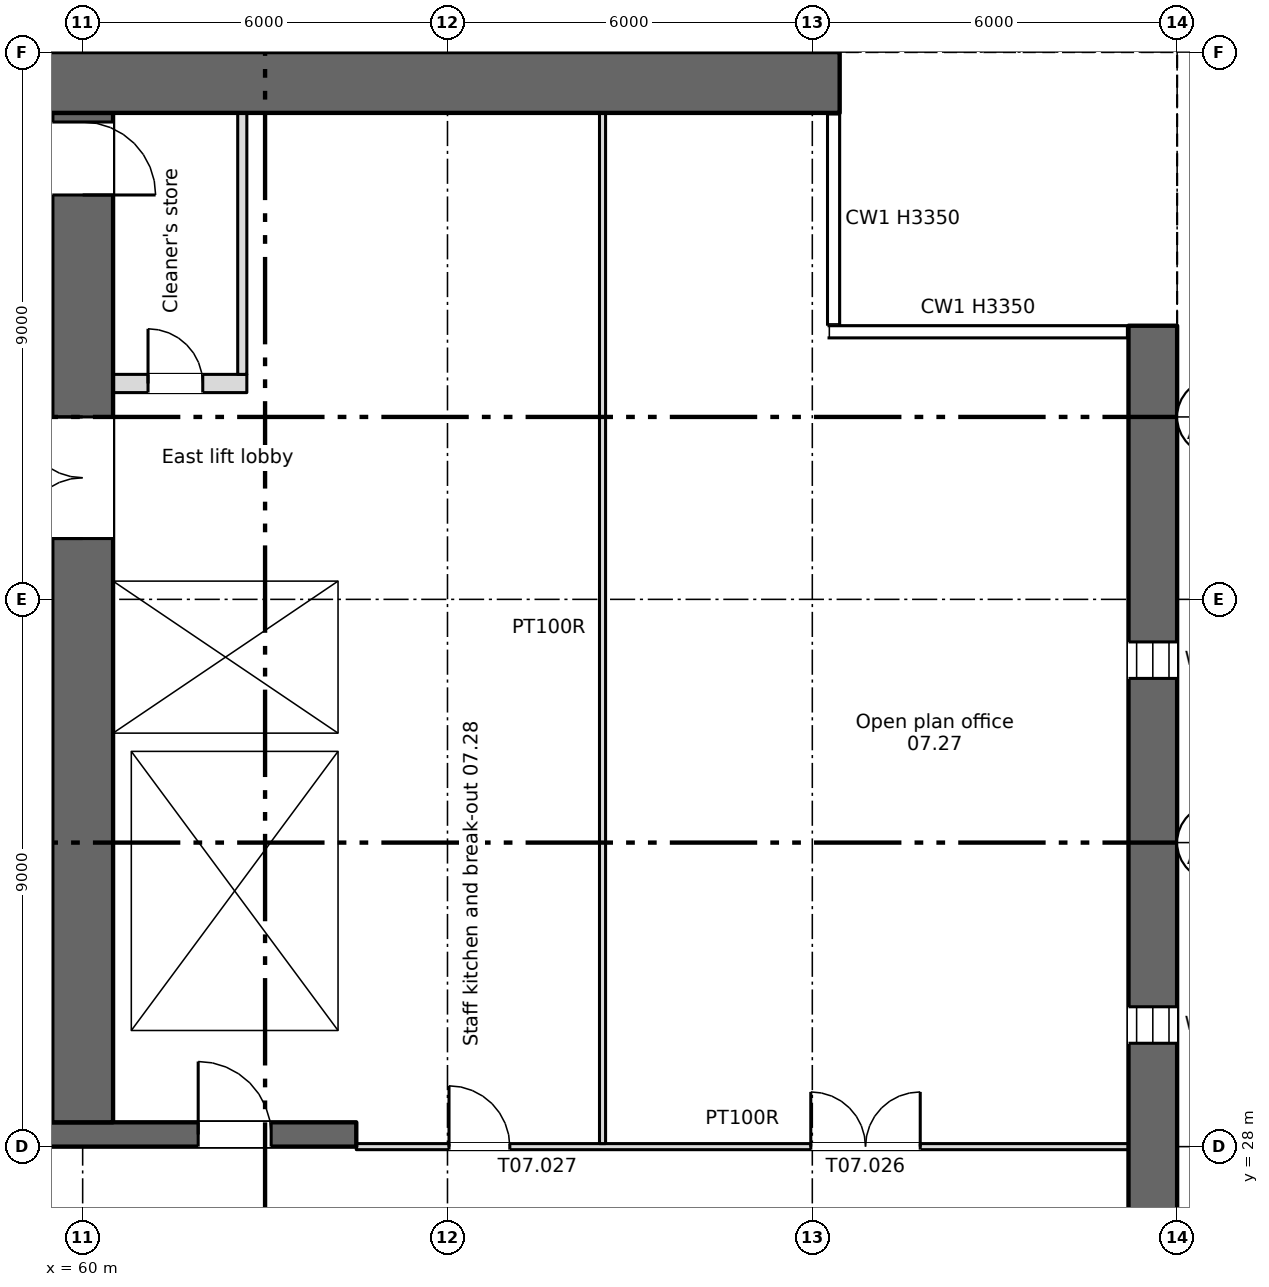
"""IFC4 building model, lengths in metres.
Left out: names, types, materials, properties, quantities, classifications, styles, units other than length and angle.
Written with IfcOpenShell. Run it as: python <this file> out.ifc"""

import sys

from ifc_helpers import new_model, si_unit, direction, frame, frame_2d, origin, place, context, subcontext, project, spatial, rectangle, extrude, element, fill, save


model = new_model("IFC4")
c1 = context("Model", 3, precision=1e-05, world=origin(), true_north=direction((0.0, 1.0)))
c2 = subcontext(c1, "Body", "Model", "MODEL_VIEW")
j1 = project(units=[si_unit("LENGTHUNIT", "METRE"), si_unit("PLANEANGLEUNIT", "RADIAN")], contexts=[c1])
p1 = place(None, origin())
s1 = spatial("IfcSite", under=j1, at=p1, CompositionType="ELEMENT")
p2 = place(p1, origin())
s2 = spatial("IfcBuilding", under=s1, at=p2, CompositionType="ELEMENT")
p3 = place(p2, frame((0.0, 0.0, 22.5)))
s3 = spatial("IfcBuildingStorey", under=s2, at=p3, CompositionType="ELEMENT", Elevation=22.5)
p4 = place(p3, frame((77.6, 4.5, 0.0), z_axis=(0.0, 0.0, 1.0), x_axis=(0.0, 1.0, 0.0)))
e1 = element("IfcWall", 1, at=p4, inside=s3, PredefinedType="SHEAR", context=c2, shape_type="SweptSolid", body=[
    extrude(rectangle(XDim=37.0, YDim=0.8, at=frame_2d((18.5, 0.0))), origin(), (0.0, 0.0, 1.0), 3.35),
])
p5 = place(p4, frame((1.2, 0.0, 0.6)))
e2 = element("IfcOpeningElement", 2, at=p5, cuts=e1, PredefinedType="OPENING", context=c2, shape_type="SweptSolid", body=[
    extrude(rectangle(XDim=0.6, YDim=2.4, at=frame_2d((0.3, 1.2))), frame((0.0, 0.41, 0.0), z_axis=(0.0, -1.0, 0.0), x_axis=(1.0, 0.0, 0.0)), (0.0, 0.0, 1.0), 0.82),
])
p6 = place(p4, frame((7.2, 0.0, 0.6)))
e3 = element("IfcOpeningElement", 3, at=p6, cuts=e1, PredefinedType="OPENING", context=c2, shape_type="SweptSolid", body=[
    extrude(rectangle(XDim=0.6, YDim=2.4, at=frame_2d((0.3, 1.2))), frame((0.0, 0.41, 0.0), z_axis=(0.0, -1.0, 0.0), x_axis=(1.0, 0.0, 0.0)), (0.0, 0.0, 1.0), 0.82),
])
p7 = place(p4, frame((13.2, 0.0, 0.6)))
e4 = element("IfcOpeningElement", 4, at=p7, cuts=e1, PredefinedType="OPENING", context=c2, shape_type="SweptSolid", body=[
    extrude(rectangle(XDim=0.6, YDim=2.4, at=frame_2d((0.3, 1.2))), frame((0.0, 0.41, 0.0), z_axis=(0.0, -1.0, 0.0), x_axis=(1.0, 0.0, 0.0)), (0.0, 0.0, 1.0), 0.82),
])
p8 = place(p4, frame((19.2, 0.0, 0.6)))
e5 = element("IfcOpeningElement", 5, at=p8, cuts=e1, PredefinedType="OPENING", context=c2, shape_type="SweptSolid", body=[
    extrude(rectangle(XDim=0.6, YDim=2.4, at=frame_2d((0.3, 1.2))), frame((0.0, 0.41, 0.0), z_axis=(0.0, -1.0, 0.0), x_axis=(1.0, 0.0, 0.0)), (0.0, 0.0, 1.0), 0.82),
])
p9 = place(p4, frame((25.2, 0.0, 0.6)))
e6 = element("IfcOpeningElement", 6, at=p9, cuts=e1, PredefinedType="OPENING", context=c2, shape_type="SweptSolid", body=[
    extrude(rectangle(XDim=0.6, YDim=2.4, at=frame_2d((0.3, 1.2))), frame((0.0, 0.41, 0.0), z_axis=(0.0, -1.0, 0.0), x_axis=(1.0, 0.0, 0.0)), (0.0, 0.0, 1.0), 0.82),
])
p10 = place(p4, frame((31.2, 0.0, 0.6)))
e7 = element("IfcOpeningElement", 7, at=p10, cuts=e1, PredefinedType="OPENING", context=c2, shape_type="SweptSolid", body=[
    extrude(rectangle(XDim=0.6, YDim=2.4, at=frame_2d((0.3, 1.2))), frame((0.0, 0.41, 0.0), z_axis=(0.0, -1.0, 0.0), x_axis=(1.0, 0.0, 0.0)), (0.0, 0.0, 1.0), 0.82),
])
p11 = place(p3, frame((5.55, 45.5, 0.0), z_axis=(0.0, 0.0, 1.0), x_axis=(1.0, 0.0, 0.0)))
e8 = element("IfcWall", 8, at=p11, inside=s3, PredefinedType="SHEAR", context=c2, shape_type="SweptSolid", body=[
    extrude(rectangle(XDim=66.9, YDim=1.0, at=frame_2d((33.45, 0.0))), origin(), (0.0, 0.0, 1.0), 3.35),
])
p12 = place(p11, frame((1.2, 0.0, 0.6)))
e9 = element("IfcOpeningElement", 9, at=p12, cuts=e8, PredefinedType="OPENING", context=c2, shape_type="SweptSolid", body=[
    extrude(rectangle(XDim=0.6, YDim=2.4, at=frame_2d((0.3, 1.2))), frame((0.0, 0.51, 0.0), z_axis=(0.0, -1.0, 0.0), x_axis=(1.0, 0.0, 0.0)), (0.0, 0.0, 1.0), 1.02),
])
p13 = place(p11, frame((7.2, 0.0, 0.6)))
e10 = element("IfcOpeningElement", 10, at=p13, cuts=e8, PredefinedType="OPENING", context=c2, shape_type="SweptSolid", body=[
    extrude(rectangle(XDim=0.6, YDim=2.4, at=frame_2d((0.3, 1.2))), frame((0.0, 0.51, 0.0), z_axis=(0.0, -1.0, 0.0), x_axis=(1.0, 0.0, 0.0)), (0.0, 0.0, 1.0), 1.02),
])
p14 = place(p3, frame((6.7, 28.2, 0.0), z_axis=(0.0, 0.0, 1.0), x_axis=(1.0, 0.0, 0.0)))
e11 = element("IfcWall", 11, at=p14, inside=s3, PredefinedType="SHEAR", context=c2, shape_type="SweptSolid", body=[
    extrude(rectangle(XDim=57.8, YDim=0.4, at=frame_2d((28.9, 0.0))), origin(), (0.0, 0.0, 1.0), 3.35),
])
p15 = place(p14, frame((12.562, 0.0, 0.0)))
e12 = element("IfcOpeningElement", 12, at=p15, cuts=e11, PredefinedType="OPENING", context=c2, shape_type="SweptSolid", body=[
    extrude(rectangle(XDim=0.9, YDim=2.1, at=frame_2d((0.45, 1.05))), frame((0.0, 0.21, 0.0), z_axis=(0.0, -1.0, 0.0), x_axis=(1.0, 0.0, 0.0)), (0.0, 0.0, 1.0), 0.42),
])
p16 = place(p14, frame((15.137, 0.0, 0.0)))
e13 = element("IfcOpeningElement", 13, at=p16, cuts=e11, PredefinedType="OPENING", context=c2, shape_type="SweptSolid", body=[
    extrude(rectangle(XDim=0.9, YDim=2.1, at=frame_2d((0.45, 1.05))), frame((0.0, 0.21, 0.0), z_axis=(0.0, -1.0, 0.0), x_axis=(1.0, 0.0, 0.0)), (0.0, 0.0, 1.0), 0.42),
])
p17 = place(p14, frame((49.85, 0.0, 0.0)))
e14 = element("IfcOpeningElement", 14, at=p17, cuts=e11, PredefinedType="OPENING", context=c2, shape_type="SweptSolid", body=[
    extrude(rectangle(XDim=0.9, YDim=2.1, at=frame_2d((0.45, 1.05))), frame((0.0, 0.21, 0.0), z_axis=(0.0, -1.0, 0.0), x_axis=(1.0, 0.0, 0.0)), (0.0, 0.0, 1.0), 0.42),
])
p18 = place(p14, frame((0.562, 0.0, 0.0)))
e15 = element("IfcOpeningElement", 15, at=p18, cuts=e11, PredefinedType="OPENING", context=c2, shape_type="SweptSolid", body=[
    extrude(rectangle(XDim=0.9, YDim=2.1, at=frame_2d((0.45, 1.05))), frame((0.0, 0.21, 0.0), z_axis=(0.0, -1.0, 0.0), x_axis=(1.0, 0.0, 0.0)), (0.0, 0.0, 1.0), 0.42),
])
p19 = place(p14, frame((2.137, 0.0, 0.0)))
e16 = element("IfcOpeningElement", 16, at=p19, cuts=e11, PredefinedType="OPENING", context=c2, shape_type="SweptSolid", body=[
    extrude(rectangle(XDim=0.9, YDim=2.1, at=frame_2d((0.45, 1.05))), frame((0.0, 0.21, 0.0), z_axis=(0.0, -1.0, 0.0), x_axis=(1.0, 0.0, 0.0)), (0.0, 0.0, 1.0), 0.42),
])
p20 = place(p14, frame((4.7, 0.0, 0.0)))
e17 = element("IfcOpeningElement", 17, at=p20, cuts=e11, PredefinedType="OPENING", context=c2, shape_type="SweptSolid", body=[
    extrude(rectangle(XDim=1.2, YDim=2.1, at=frame_2d((0.6, 1.05))), frame((0.0, 0.21, 0.0), z_axis=(0.0, -1.0, 0.0), x_axis=(1.0, 0.0, 0.0)), (0.0, 0.0, 1.0), 0.42),
])
p21 = place(p14, frame((31.7, 0.0, 0.0)))
e18 = element("IfcOpeningElement", 18, at=p21, cuts=e11, PredefinedType="OPENING", context=c2, shape_type="SweptSolid", body=[
    extrude(rectangle(XDim=1.2, YDim=2.1, at=frame_2d((0.6, 1.05))), frame((0.0, 0.21, 0.0), z_axis=(0.0, -1.0, 0.0), x_axis=(1.0, 0.0, 0.0)), (0.0, 0.0, 1.0), 0.42),
])
p22 = place(p14, frame((55.2, 0.0, 0.0)))
e19 = element("IfcOpeningElement", 19, at=p22, cuts=e11, PredefinedType="OPENING", context=c2, shape_type="SweptSolid", body=[
    extrude(rectangle(XDim=1.2, YDim=2.1, at=frame_2d((0.6, 1.05))), frame((0.0, 0.21, 0.0), z_axis=(0.0, -1.0, 0.0), x_axis=(1.0, 0.0, 0.0)), (0.0, 0.0, 1.0), 0.42),
])
p23 = place(p14, frame((21.7, 0.0, 0.0)))
e20 = element("IfcOpeningElement", 20, at=p23, cuts=e11, PredefinedType="OPENING", context=c2, shape_type="SweptSolid", body=[
    extrude(rectangle(XDim=1.2, YDim=2.1, at=frame_2d((0.6, 1.05))), frame((0.0, 0.21, 0.0), z_axis=(0.0, -1.0, 0.0), x_axis=(1.0, 0.0, 0.0)), (0.0, 0.0, 1.0), 0.42),
])
p24 = place(p14, frame((41.7, 0.0, 0.0)))
e21 = element("IfcOpeningElement", 21, at=p24, cuts=e11, PredefinedType="OPENING", context=c2, shape_type="SweptSolid", body=[
    extrude(rectangle(XDim=1.2, YDim=2.1, at=frame_2d((0.6, 1.05))), frame((0.0, 0.21, 0.0), z_axis=(0.0, -1.0, 0.0), x_axis=(1.0, 0.0, 0.0)), (0.0, 0.0, 1.0), 0.42),
])
p25 = place(p14, frame((24.85, 0.0, 0.0)))
e22 = element("IfcOpeningElement", 22, at=p25, cuts=e11, PredefinedType="OPENING", context=c2, shape_type="SweptSolid", body=[
    extrude(rectangle(XDim=2.4, YDim=2.1, at=frame_2d((1.2, 1.05))), frame((0.0, 0.21, 0.0), z_axis=(0.0, -1.0, 0.0), x_axis=(1.0, 0.0, 0.0)), (0.0, 0.0, 1.0), 0.42),
])
p26 = place(p14, frame((37.35, 0.0, 0.0)))
e23 = element("IfcOpeningElement", 23, at=p26, cuts=e11, PredefinedType="OPENING", context=c2, shape_type="SweptSolid", body=[
    extrude(rectangle(XDim=2.4, YDim=2.1, at=frame_2d((1.2, 1.05))), frame((0.0, 0.21, 0.0), z_axis=(0.0, -1.0, 0.0), x_axis=(1.0, 0.0, 0.0)), (0.0, 0.0, 1.0), 0.42),
])
p27 = place(p14, frame((7.85, 0.0, 0.0)))
e24 = element("IfcOpeningElement", 24, at=p27, cuts=e11, PredefinedType="OPENING", context=c2, shape_type="SweptSolid", body=[
    extrude(rectangle(XDim=2.4, YDim=2.1, at=frame_2d((1.2, 1.05))), frame((0.0, 0.21, 0.0), z_axis=(0.0, -1.0, 0.0), x_axis=(1.0, 0.0, 0.0)), (0.0, 0.0, 1.0), 0.42),
])
p28 = place(p14, frame((28.85, 0.0, 0.0)))
e25 = element("IfcOpeningElement", 25, at=p28, cuts=e11, PredefinedType="OPENING", context=c2, shape_type="SweptSolid", body=[
    extrude(rectangle(XDim=0.9, YDim=2.1, at=frame_2d((0.45, 1.05))), frame((0.0, 0.21, 0.0), z_axis=(0.0, -1.0, 0.0), x_axis=(1.0, 0.0, 0.0)), (0.0, 0.0, 1.0), 0.42),
])
p29 = place(p14, frame((34.85, 0.0, 0.0)))
e26 = element("IfcOpeningElement", 26, at=p29, cuts=e11, PredefinedType="OPENING", context=c2, shape_type="SweptSolid", body=[
    extrude(rectangle(XDim=0.9, YDim=2.1, at=frame_2d((0.45, 1.05))), frame((0.0, 0.21, 0.0), z_axis=(0.0, -1.0, 0.0), x_axis=(1.0, 0.0, 0.0)), (0.0, 0.0, 1.0), 0.42),
])
p30 = place(p3, frame((64.35, 34.8, 0.0), z_axis=(0.0, 0.0, 1.0), x_axis=(0.0, 1.0, 0.0)))
e27 = element("IfcWall", 27, at=p30, inside=s3, PredefinedType="SHEAR", context=c2, shape_type="SweptSolid", body=[
    extrude(rectangle(XDim=10.2, YDim=0.3, at=frame_2d((5.1, 0.0))), origin(), (0.0, 0.0, 1.0), 3.35),
])
p31 = place(p3, frame((60.0, 28.4, 0.0), z_axis=(0.0, 0.0, 1.0), x_axis=(0.0, 1.0, 0.0)))
e28 = element("IfcWall", 28, at=p31, inside=s3, PredefinedType="SHEAR", context=c2, shape_type="SweptSolid", body=[
    extrude(rectangle(XDim=16.6, YDim=1.0, at=frame_2d((8.3, 0.0))), origin(), (0.0, 0.0, 1.0), 3.35),
])
p32 = place(p31, frame((9.6, 0.0, 0.0)))
e29 = element("IfcOpeningElement", 29, at=p32, cuts=e28, PredefinedType="OPENING", context=c2, shape_type="SweptSolid", body=[
    extrude(rectangle(XDim=2.0, YDim=2.1, at=frame_2d((1.0, 1.05))), frame((0.0, 0.51, 0.0), z_axis=(0.0, -1.0, 0.0), x_axis=(1.0, 0.0, 0.0)), (0.0, 0.0, 1.0), 1.02),
])
p33 = place(p31, frame((15.25, 0.0, 0.0)))
e30 = element("IfcOpeningElement", 30, at=p33, cuts=e28, PredefinedType="OPENING", context=c2, shape_type="SweptSolid", body=[
    extrude(rectangle(XDim=1.2, YDim=2.1, at=frame_2d((0.6, 1.05))), frame((0.0, 0.51, 0.0), z_axis=(0.0, -1.0, 0.0), x_axis=(1.0, 0.0, 0.0)), (0.0, 0.0, 1.0), 1.02),
])
for number, where, z_axis, x_axis in (
    (31, (60.65, 28.4, 0.0), (0.0, 0.0, 1.0), (0.0, 1.0, 0.0)),
    (32, (64.35, 28.4, 0.0), (0.0, 0.0, 1.0), (0.0, 1.0, 0.0)),
):
    element("IfcWall", number, at=place(p3, frame(where, z_axis=z_axis, x_axis=x_axis)), inside=s3, PredefinedType="SHEAR", context=c2, shape_type="SweptSolid", body=[
        extrude(rectangle(XDim=6.1, YDim=0.3, at=frame_2d((3.05, 0.0))), origin(), (0.0, 0.0, 1.0), 3.35),
    ])
p34 = place(p3, frame((47.3, 34.65, 0.0), z_axis=(0.0, 0.0, 1.0), x_axis=(1.0, 0.0, 0.0)))
e33 = element("IfcWall", 33, at=p34, inside=s3, PredefinedType="SHEAR", context=c2, shape_type="SweptSolid", body=[
    extrude(rectangle(XDim=12.2, YDim=0.3, at=frame_2d((6.1, 0.0))), origin(), (0.0, 0.0, 1.0), 3.35),
])
p35 = place(p34, frame((1.3, 0.0, 0.0)))
e34 = element("IfcOpeningElement", 34, at=p35, cuts=e33, PredefinedType="OPENING", context=c2, shape_type="SweptSolid", body=[
    extrude(rectangle(XDim=1.1, YDim=2.1, at=frame_2d((0.55, 1.05))), frame((0.0, 0.16, 0.0), z_axis=(0.0, -1.0, 0.0), x_axis=(1.0, 0.0, 0.0)), (0.0, 0.0, 1.0), 0.32),
])
p36 = place(p3, frame((60.5, 34.65, 0.0), z_axis=(0.0, 0.0, 1.0), x_axis=(1.0, 0.0, 0.0)))
e35 = element("IfcWall", 35, at=p36, inside=s3, PredefinedType="SHEAR", context=c2, shape_type="SweptSolid", body=[
    extrude(rectangle(XDim=4.0, YDim=0.3, at=frame_2d((2.0, 0.0))), origin(), (0.0, 0.0, 1.0), 3.35),
])
p37 = place(p3, frame((60.5, 37.45, 0.0), z_axis=(0.0, 0.0, 1.0), x_axis=(1.0, 0.0, 0.0)))
e36 = element("IfcWall", 36, at=p37, inside=s3, PredefinedType="SHEAR", context=c2, shape_type="SweptSolid", body=[
    extrude(rectangle(XDim=3.7, YDim=0.3, at=frame_2d((1.85, 0.0))), origin(), (0.0, 0.0, 1.0), 3.35),
])
p38 = place(p37, frame((1.3, 0.0, 0.0)))
e37 = element("IfcOpeningElement", 37, at=p38, cuts=e36, PredefinedType="OPENING", context=c2, shape_type="SweptSolid", body=[
    extrude(rectangle(XDim=1.1, YDim=2.1, at=frame_2d((0.55, 1.05))), frame((0.0, 0.16, 0.0), z_axis=(0.0, -1.0, 0.0), x_axis=(1.0, 0.0, 0.0)), (0.0, 0.0, 1.0), 0.32),
])
p39 = place(p3, frame((60.5, 40.55, 0.0), z_axis=(0.0, 0.0, 1.0), x_axis=(1.0, 0.0, 0.0)))
e38 = element("IfcWall", 38, at=p39, inside=s3, PredefinedType="PARTITIONING", context=c2, shape_type="SweptSolid", body=[
    extrude(rectangle(XDim=2.2, YDim=0.3, at=frame_2d((1.1, 0.0))), origin(), (0.0, 0.0, 1.0), 3.35),
])
p40 = place(p39, frame((0.575, 0.0, 0.0)))
e39 = element("IfcOpeningElement", 39, at=p40, cuts=e38, PredefinedType="OPENING", context=c2, shape_type="SweptSolid", body=[
    extrude(rectangle(XDim=0.9, YDim=2.1, at=frame_2d((0.45, 1.05))), frame((0.0, 0.16, 0.0), z_axis=(0.0, -1.0, 0.0), x_axis=(1.0, 0.0, 0.0)), (0.0, 0.0, 1.0), 0.32),
])
p41 = place(p3, frame((62.625, 40.7, 0.0), z_axis=(0.0, 0.0, 1.0), x_axis=(0.0, 1.0, 0.0)))
e40 = element("IfcWall", 40, at=p41, inside=s3, PredefinedType="PARTITIONING", context=c2, shape_type="SweptSolid", body=[
    extrude(rectangle(XDim=4.3, YDim=0.15, at=frame_2d((2.15, 0.0))), origin(), (0.0, 0.0, 1.0), 3.35),
])
p42 = place(p3, frame((64.5, 28.0, 0.0), z_axis=(0.0, 0.0, 1.0), x_axis=(1.0, 0.0, 0.0)))
e41 = element("IfcWall", 41, at=p42, inside=s3, PredefinedType="PARTITIONING", context=c2, shape_type="SweptSolid", body=[
    extrude(rectangle(XDim=12.7, YDim=0.1, at=frame_2d((6.35, 0.0))), origin(), (0.0, 0.0, 1.0), 3.35),
])
p43 = place(p42, frame((7.475, 0.0, 0.0)))
e42 = element("IfcOpeningElement", 42, at=p43, cuts=e41, PredefinedType="OPENING", context=c2, shape_type="SweptSolid", body=[
    extrude(rectangle(XDim=1.8, YDim=2.1, at=frame_2d((0.9, 1.05))), frame((0.0, 0.06, 0.0), z_axis=(0.0, -1.0, 0.0), x_axis=(1.0, 0.0, 0.0)), (0.0, 0.0, 1.0), 0.12),
])
p44 = place(p42, frame((1.525, 0.0, 0.0)))
e43 = element("IfcOpeningElement", 43, at=p44, cuts=e41, PredefinedType="OPENING", context=c2, shape_type="SweptSolid", body=[
    extrude(rectangle(XDim=1.0, YDim=2.1, at=frame_2d((0.5, 1.05))), frame((0.0, 0.06, 0.0), z_axis=(0.0, -1.0, 0.0), x_axis=(1.0, 0.0, 0.0)), (0.0, 0.0, 1.0), 0.12),
])
p45 = place(p3, frame((68.55, 28.05, 0.0), z_axis=(0.0, 0.0, 1.0), x_axis=(0.0, 1.0, 0.0)))
e44 = element("IfcWall", 44, at=p45, inside=s3, PredefinedType="PARTITIONING", context=c2, shape_type="SweptSolid", body=[
    extrude(rectangle(XDim=16.95, YDim=0.1, at=frame_2d((8.475, 0.0))), origin(), (0.0, 0.0, 1.0), 3.35),
])
p46 = place(p9, origin())
e45 = element("IfcWindow", 45, at=p46, inside=s3, PartitioningType="SINGLE_PANEL", PredefinedType="WINDOW", context=c2, shape_type="SweptSolid", body=[
    extrude(rectangle(XDim=0.6, YDim=2.4, at=frame_2d((0.3, 1.2))), frame((0.0, 0.03, 0.0), z_axis=(0.0, -1.0, 0.0), x_axis=(1.0, 0.0, 0.0)), (0.0, 0.0, 1.0), 0.06),
])
fill(e6, e45)
p47 = place(p10, origin())
e46 = element("IfcWindow", 46, at=p47, inside=s3, PartitioningType="SINGLE_PANEL", PredefinedType="WINDOW", context=c2, shape_type="SweptSolid", body=[
    extrude(rectangle(XDim=0.6, YDim=2.4, at=frame_2d((0.3, 1.2))), frame((0.0, 0.03, 0.0), z_axis=(0.0, -1.0, 0.0), x_axis=(1.0, 0.0, 0.0)), (0.0, 0.0, 1.0), 0.06),
])
fill(e7, e46)
p48 = place(p40, origin())
e47 = element("IfcDoor", 47, at=p48, inside=s3, OperationType="SINGLE_SWING_LEFT", PredefinedType="DOOR", context=c2, shape_type="SweptSolid", body=[
    extrude(rectangle(XDim=0.9, YDim=2.1, at=frame_2d((0.45, 1.05))), frame((0.0, 0.025, 0.0), z_axis=(0.0, -1.0, 0.0), x_axis=(1.0, 0.0, 0.0)), (0.0, 0.0, 1.0), 0.05),
])
fill(e39, e47)
p49 = place(p38, origin())
e48 = element("IfcDoor", 48, at=p49, inside=s3, OperationType="SLIDING_TO_LEFT", PredefinedType="DOOR", context=c2, shape_type="SweptSolid", body=[
    extrude(rectangle(XDim=1.1, YDim=2.1, at=frame_2d((0.55, 1.05))), frame((0.0, 0.025, 0.0), z_axis=(0.0, -1.0, 0.0), x_axis=(1.0, 0.0, 0.0)), (0.0, 0.0, 1.0), 0.05),
])
fill(e37, e48)
p50 = place(p22, origin())
e49 = element("IfcDoor", 49, at=p50, inside=s3, OperationType="SINGLE_SWING_LEFT", PredefinedType="DOOR", context=c2, shape_type="SweptSolid", body=[
    extrude(rectangle(XDim=1.2, YDim=2.1, at=frame_2d((0.6, 1.05))), frame((0.0, 0.025, 0.0), z_axis=(0.0, -1.0, 0.0), x_axis=(1.0, 0.0, 0.0)), (0.0, 0.0, 1.0), 0.05),
])
fill(e19, e49)
p51 = place(p32, origin())
e50 = element("IfcDoor", 50, at=p51, inside=s3, OperationType="DOUBLE_DOOR_SINGLE_SWING", PredefinedType="DOOR", context=c2, shape_type="SweptSolid", body=[
    extrude(rectangle(XDim=2.0, YDim=2.1, at=frame_2d((1.0, 1.05))), frame((0.0, 0.025, 0.0), z_axis=(0.0, -1.0, 0.0), x_axis=(1.0, 0.0, 0.0)), (0.0, 0.0, 1.0), 0.05),
])
fill(e29, e50)
p52 = place(p33, origin())
e51 = element("IfcDoor", 51, at=p52, inside=s3, OperationType="SINGLE_SWING_LEFT", PredefinedType="DOOR", context=c2, shape_type="SweptSolid", body=[
    extrude(rectangle(XDim=1.2, YDim=2.1, at=frame_2d((0.6, 1.05))), frame((0.0, 0.025, 0.0), z_axis=(0.0, -1.0, 0.0), x_axis=(1.0, 0.0, 0.0)), (0.0, 0.0, 1.0), 0.05),
])
fill(e30, e51)
p53 = place(p43, origin())
e52 = element("IfcDoor", 52, at=p53, inside=s3, OperationType="DOUBLE_DOOR_SINGLE_SWING", PredefinedType="DOOR", context=c2, shape_type="SweptSolid", body=[
    extrude(rectangle(XDim=1.8, YDim=2.1, at=frame_2d((0.9, 1.05))), frame((0.0, 0.025, 0.0), z_axis=(0.0, -1.0, 0.0), x_axis=(1.0, 0.0, 0.0)), (0.0, 0.0, 1.0), 0.05),
])
fill(e42, e52)
p54 = place(p44, origin())
e53 = element("IfcDoor", 53, at=p54, inside=s3, OperationType="SINGLE_SWING_LEFT", PredefinedType="DOOR", context=c2, shape_type="SweptSolid", body=[
    extrude(rectangle(XDim=1.0, YDim=2.1, at=frame_2d((0.5, 1.05))), frame((0.0, 0.025, 0.0), z_axis=(0.0, -1.0, 0.0), x_axis=(1.0, 0.0, 0.0)), (0.0, 0.0, 1.0), 0.05),
])
fill(e43, e53)
save(model, sys.argv[1])
